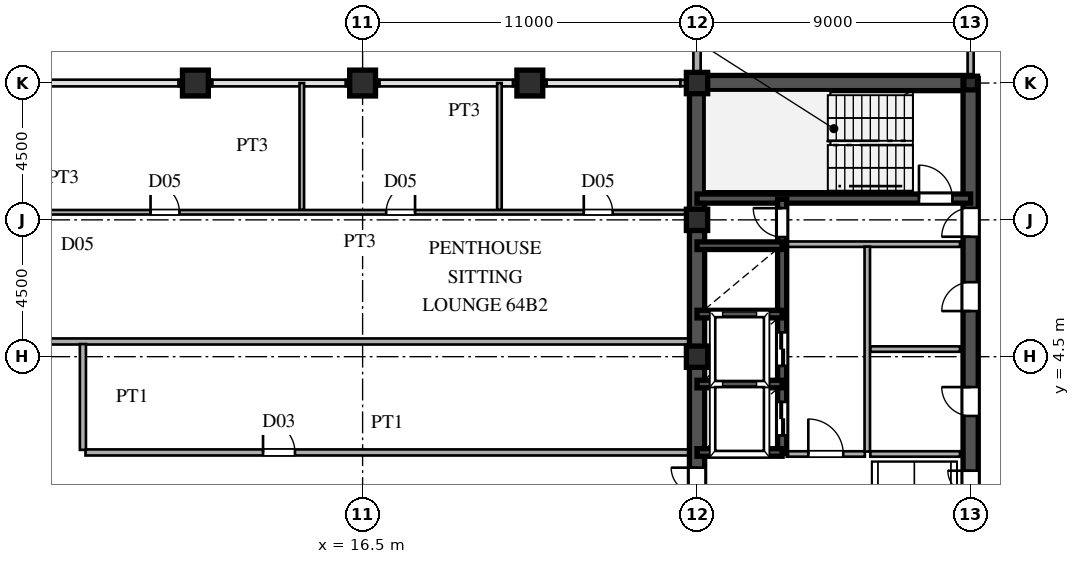
"""IFC4 building model, lengths in metres.
Left out: names, types, materials, properties, quantities, classifications, styles, units other than length and angle.
Written with IfcOpenShell. Run it as: python <this file> out.ifc"""

import sys

from ifc_helpers import new_model, si_unit, direction, frame, frame_2d, origin, origin_2d, place, context, subcontext, project, spatial, rectangle, hollow_rectangle, i_section, extrude, source, transform, mapped, element, fill, save


model = new_model("IFC4")
c1 = context("Model", 3, precision=1e-05, world=origin(), true_north=direction((0.0, 1.0)))
c2 = subcontext(c1, "Body", "Model", "MODEL_VIEW")
j1 = project(units=[si_unit("LENGTHUNIT", "METRE"), si_unit("PLANEANGLEUNIT", "RADIAN")], contexts=[c1])
p1 = place(None, origin())
s1 = spatial("IfcSite", under=j1, at=p1, CompositionType="ELEMENT")
p2 = place(p1, origin())
s2 = spatial("IfcBuilding", under=s1, at=p2, CompositionType="ELEMENT")
p3 = place(p2, frame((0.0, 0.0, 243.15)))
s3 = spatial("IfcBuildingStorey", under=s2, at=p3, CompositionType="ELEMENT", Elevation=243.15)
m1 = source(origin(), c2, "Body", "SweptSolid", [
    extrude(hollow_rectangle(XDim=0.7, YDim=0.7, WallThickness=0.03, at=origin_2d()), origin(), (0.0, 0.0, 1.0), 3.75),
])
for number, where, z_axis, x_axis in (
    (1, (27.5, 4.5, 0.0), (0.0, 0.0, 1.0), (1.0, 0.0, 0.0)),
    (2, (27.5, 9.0, 0.0), (0.0, 0.0, 1.0), (1.0, 0.0, 0.0)),
    (3, (27.5, 13.5, 0.0), (0.0, 0.0, 1.0), (1.0, 0.0, 0.0)),
):
    element("IfcColumn", number, at=place(p3, frame(where, z_axis=z_axis, x_axis=x_axis)), inside=s3, PredefinedType="COLUMN", context=c2, shape_type="MappedRepresentation", body=[
        mapped(m1, transform((0.0, 0.0, 0.0), scale=1.0)),
    ])
m2 = source(origin(), c2, "Body", "SweptSolid", [
    extrude(i_section(OverallWidth=0.45, OverallDepth=0.45, WebThickness=0.016, FlangeThickness=0.025, at=origin_2d()), origin(), (0.0, 0.0, 1.0), 3.75),
])
p4 = place(p3, frame((36.5, 13.5, 0.0), z_axis=(0.0, 0.0, 1.0), x_axis=(1.0, 0.0, 0.0)))
e4 = element("IfcColumn", 4, at=p4, inside=s3, PredefinedType="COLUMN", context=c2, shape_type="MappedRepresentation", body=[
    mapped(m2, transform((0.0, 0.0, 0.0), scale=1.0)),
])
m3 = source(origin(), c2, "Body", "SweptSolid", [
    extrude(hollow_rectangle(XDim=0.85, YDim=0.85, WallThickness=0.036, at=origin_2d()), origin(), (0.0, 0.0, 1.0), 3.75),
])
for number, where, z_axis, x_axis in (
    (5, (11.0, 13.5, 0.0), (0.0, 0.0, 1.0), (1.0, 0.0, 0.0)),
    (6, (16.5, 13.5, 0.0), (0.0, 0.0, 1.0), (1.0, 0.0, 0.0)),
    (7, (22.0, 13.5, 0.0), (0.0, 0.0, 1.0), (1.0, 0.0, 0.0)),
):
    element("IfcColumn", number, at=place(p3, frame(where, z_axis=z_axis, x_axis=x_axis)), inside=s3, PredefinedType="COLUMN", context=c2, shape_type="MappedRepresentation", body=[
        mapped(m3, transform((0.0, 0.0, 0.0), scale=1.0)),
    ])
p5 = place(p3, frame((27.5, 13.755, 0.0), z_axis=(0.0, 0.0, 1.0), x_axis=(0.0, 1.0, 0.0)))
e8 = element("IfcWall", 8, at=p5, inside=s3, PredefinedType="SOLIDWALL", context=c2, shape_type="SweptSolid", body=[
    extrude(rectangle(XDim=0.62, YDim=0.24, at=frame_2d((0.31, 0.0))), origin(), (0.0, 0.0, 1.0), 3.03),
])
p6 = place(p3, frame((27.5, 14.375, 0.0), z_axis=(0.0, 0.0, 1.0), x_axis=(0.0, 1.0, 0.0)))
e9 = element("IfcWall", 9, at=p6, inside=s3, PredefinedType="SOLIDWALL", context=c2, shape_type="SweptSolid", body=[
    extrude(rectangle(XDim=1.605, YDim=0.24, at=frame_2d((0.803, 0.0))), origin(), (0.0, 0.0, 1.0), 3.53),
])
for number, where, z_axis, x_axis in (
    (10, (10.45, 13.5, 0.0), (0.0, 0.0, 1.0), (1.0, 0.0, 0.0)),
    (11, (15.95, 13.5, 0.0), (0.0, 0.0, 1.0), (1.0, 0.0, 0.0)),
    (12, (21.45, 13.5, 0.0), (0.0, 0.0, 1.0), (1.0, 0.0, 0.0)),
):
    element("IfcWall", number, at=place(p3, frame(where, z_axis=z_axis, x_axis=x_axis)), inside=s3, PredefinedType="SOLIDWALL", context=c2, shape_type="SweptSolid", body=[
        extrude(rectangle(XDim=1.1, YDim=0.21, at=frame_2d((0.55, 0.0))), origin(), (0.0, 0.0, 1.0), 3.03),
    ])
p7 = place(p3, frame((26.95, 13.5, 0.0), z_axis=(0.0, 0.0, 1.0), x_axis=(1.0, 0.0, 0.0)))
e13 = element("IfcWall", 13, at=p7, inside=s3, PredefinedType="SOLIDWALL", context=c2, shape_type="SweptSolid", body=[
    extrude(rectangle(XDim=0.54, YDim=0.21, at=frame_2d((0.27, 0.0))), origin(), (0.0, 0.0, 1.0), 3.03),
])
p8 = place(p3, frame((27.5, 1.3, 0.0), z_axis=(0.0, 0.0, 1.0), x_axis=(0.0, 1.0, 0.0)))
e14 = element("IfcWall", 14, at=p8, inside=s3, PredefinedType="SHEAR", context=c2, shape_type="SweptSolid", body=[
    extrude(rectangle(XDim=12.2, YDim=0.5, at=frame_2d((6.1, 0.0))), origin(), (0.0, 0.0, 1.0), 3.53),
])
p9 = place(p3, frame((27.5, -1.3, 0.0), z_axis=(0.0, 0.0, 1.0), x_axis=(0.0, 1.0, 0.0)))
e15 = element("IfcWall", 15, at=p9, inside=s3, PredefinedType="SHEAR", context=c2, shape_type="SweptSolid", body=[
    extrude(rectangle(XDim=2.6, YDim=0.5, at=frame_2d((1.3, 0.0))), origin(), (0.0, 0.0, 1.0), 3.53),
])
p10 = place(p9, frame((0.45, 0.0, 0.0)))
e16 = element("IfcOpeningElement", 16, at=p10, cuts=e15, PredefinedType="OPENING", context=c2, shape_type="SweptSolid", body=[
    extrude(rectangle(XDim=1.7, YDim=2.35, at=frame_2d((0.85, 1.175))), frame((0.0, 0.26, 0.0), z_axis=(0.0, -1.0, 0.0), x_axis=(1.0, 0.0, 0.0)), (0.0, 0.0, 1.0), 0.52),
])
p11 = place(p3, frame((27.5, 13.5, 0.0), z_axis=(0.0, 0.0, 1.0), x_axis=(1.0, 0.0, 0.0)))
e17 = element("IfcWall", 17, at=p11, inside=s3, PredefinedType="SHEAR", context=c2, shape_type="SweptSolid", body=[
    extrude(rectangle(XDim=9.0, YDim=0.5, at=frame_2d((4.5, 0.0))), origin(), (0.0, 0.0, 1.0), 3.53),
])
p12 = place(p3, frame((36.5, -1.3, 0.0), z_axis=(0.0, 0.0, 1.0), x_axis=(0.0, 1.0, 0.0)))
e18 = element("IfcWall", 18, at=p12, inside=s3, PredefinedType="SHEAR", context=c2, shape_type="SweptSolid", body=[
    extrude(rectangle(XDim=2.6, YDim=0.5, at=frame_2d((1.3, 0.0))), origin(), (0.0, 0.0, 1.0), 3.53),
])
p13 = place(p12, frame((0.55, 0.0, 0.0)))
e19 = element("IfcOpeningElement", 19, at=p13, cuts=e18, PredefinedType="OPENING", context=c2, shape_type="SweptSolid", body=[
    extrude(rectangle(XDim=1.5, YDim=2.3, at=frame_2d((0.75, 1.15))), frame((0.0, 0.26, 0.0), z_axis=(0.0, -1.0, 0.0), x_axis=(1.0, 0.0, 0.0)), (0.0, 0.0, 1.0), 0.52),
])
p14 = place(p3, frame((36.5, 8.2, 0.0), z_axis=(0.0, 0.0, 1.0), x_axis=(0.0, 1.0, 0.0)))
e20 = element("IfcWall", 20, at=p14, inside=s3, PredefinedType="SHEAR", context=c2, shape_type="SweptSolid", body=[
    extrude(rectangle(XDim=5.45, YDim=0.5, at=frame_2d((2.725, 0.0))), origin(), (0.0, 0.0, 1.0), 3.53),
])
p15 = place(p14, frame((0.245, 0.0, 0.0)))
e21 = element("IfcOpeningElement", 21, at=p15, cuts=e20, PredefinedType="OPENING", context=c2, shape_type="SweptSolid", body=[
    extrude(rectangle(XDim=0.95, YDim=2.15, at=frame_2d((0.475, 1.075))), frame((0.0, 0.26, 0.0), z_axis=(0.0, -1.0, 0.0), x_axis=(1.0, 0.0, 0.0)), (0.0, 0.0, 1.0), 0.52),
])
p16 = place(p3, frame((36.5, 1.3, 0.0), z_axis=(0.0, 0.0, 1.0), x_axis=(0.0, 1.0, 0.0)))
e22 = element("IfcWall", 22, at=p16, inside=s3, PredefinedType="SHEAR", context=c2, shape_type="SweptSolid", body=[
    extrude(rectangle(XDim=3.45, YDim=0.5, at=frame_2d((1.725, 0.0))), origin(), (0.0, 0.0, 1.0), 3.53),
])
p17 = place(p16, frame((1.25, 0.0, 0.0)))
e23 = element("IfcOpeningElement", 23, at=p17, cuts=e22, PredefinedType="OPENING", context=c2, shape_type="SweptSolid", body=[
    extrude(rectangle(XDim=0.95, YDim=2.15, at=frame_2d((0.475, 1.075))), frame((0.0, 0.26, 0.0), z_axis=(0.0, -1.0, 0.0), x_axis=(1.0, 0.0, 0.0)), (0.0, 0.0, 1.0), 0.52),
])
p18 = place(p3, frame((36.5, 4.75, 0.0), z_axis=(0.0, 0.0, 1.0), x_axis=(0.0, 1.0, 0.0)))
e24 = element("IfcWall", 24, at=p18, inside=s3, PredefinedType="SHEAR", context=c2, shape_type="SweptSolid", body=[
    extrude(rectangle(XDim=3.45, YDim=0.5, at=frame_2d((1.725, 0.0))), origin(), (0.0, 0.0, 1.0), 3.53),
])
p19 = place(p18, frame((1.25, 0.0, 0.0)))
e25 = element("IfcOpeningElement", 25, at=p19, cuts=e24, PredefinedType="OPENING", context=c2, shape_type="SweptSolid", body=[
    extrude(rectangle(XDim=0.95, YDim=2.15, at=frame_2d((0.475, 1.075))), frame((0.0, 0.26, 0.0), z_axis=(0.0, -1.0, 0.0), x_axis=(1.0, 0.0, 0.0)), (0.0, 0.0, 1.0), 0.52),
])
p20 = place(p3, frame((27.5, 9.7, 0.0), z_axis=(0.0, 0.0, 1.0), x_axis=(1.0, 0.0, 0.0)))
e26 = element("IfcWall", 26, at=p20, inside=s3, PredefinedType="SHEAR", context=c2, shape_type="SweptSolid", body=[
    extrude(rectangle(XDim=9.0, YDim=0.3, at=frame_2d((4.5, 0.0))), origin(), (0.0, 0.0, 1.0), 3.53),
])
p21 = place(p20, frame((7.3, 0.0, 0.0)))
e27 = element("IfcOpeningElement", 27, at=p21, cuts=e26, PredefinedType="OPENING", context=c2, shape_type="SweptSolid", body=[
    extrude(rectangle(XDim=1.1, YDim=2.2, at=frame_2d((0.55, 1.1))), frame((0.0, 0.16, 0.0), z_axis=(0.0, -1.0, 0.0), x_axis=(1.0, 0.0, 0.0)), (0.0, 0.0, 1.0), 0.32),
])
for number, where, z_axis, x_axis in (
    (28, (27.5, 1.35, 0.0), (0.0, 0.0, 1.0), (1.0, 0.0, 0.0)),
    (29, (27.5, 3.6, 0.0), (0.0, 0.0, 1.0), (1.0, 0.0, 0.0)),
    (30, (27.5, 5.9, 0.0), (0.0, 0.0, 1.0), (1.0, 0.0, 0.0)),
    (31, (27.5, 8.15, 0.0), (0.0, 0.0, 1.0), (1.0, 0.0, 0.0)),
):
    element("IfcWall", number, at=place(p3, frame(where, z_axis=z_axis, x_axis=x_axis)), inside=s3, PredefinedType="SHEAR", context=c2, shape_type="SweptSolid", body=[
        extrude(rectangle(XDim=2.8, YDim=0.25, at=frame_2d((1.4, 0.0))), origin(), (0.0, 0.0, 1.0), 3.53),
    ])
p22 = place(p3, frame((30.3, 1.32, 0.0), z_axis=(0.0, 0.0, 1.0), x_axis=(0.0, 1.0, 0.0)))
e32 = element("IfcWall", 32, at=p22, inside=s3, PredefinedType="SHEAR", context=c2, shape_type="SweptSolid", body=[
    extrude(rectangle(XDim=2.28, YDim=0.3, at=frame_2d((1.14, 0.0))), origin(), (0.0, 0.0, 1.0), 3.53),
])
p23 = place(p22, frame((0.59, 0.0, 0.0)))
e33 = element("IfcOpeningElement", 33, at=p23, cuts=e32, PredefinedType="OPENING", context=c2, shape_type="SweptSolid", body=[
    extrude(rectangle(XDim=1.1, YDim=2.2, at=frame_2d((0.55, 1.1))), frame((0.0, 0.16, 0.0), z_axis=(0.0, -1.0, 0.0), x_axis=(1.0, 0.0, 0.0)), (0.0, 0.0, 1.0), 0.32),
])
p24 = place(p3, frame((30.3, 3.6, 0.0), z_axis=(0.0, 0.0, 1.0), x_axis=(0.0, 1.0, 0.0)))
e34 = element("IfcWall", 34, at=p24, inside=s3, PredefinedType="SHEAR", context=c2, shape_type="SweptSolid", body=[
    extrude(rectangle(XDim=2.3, YDim=0.3, at=frame_2d((1.15, 0.0))), origin(), (0.0, 0.0, 1.0), 3.53),
])
p25 = place(p24, frame((0.6, 0.0, 0.0)))
e35 = element("IfcOpeningElement", 35, at=p25, cuts=e34, PredefinedType="OPENING", context=c2, shape_type="SweptSolid", body=[
    extrude(rectangle(XDim=1.1, YDim=2.2, at=frame_2d((0.55, 1.1))), frame((0.0, 0.16, 0.0), z_axis=(0.0, -1.0, 0.0), x_axis=(1.0, 0.0, 0.0)), (0.0, 0.0, 1.0), 0.32),
])
p26 = place(p3, frame((30.3, 5.9, 0.0), z_axis=(0.0, 0.0, 1.0), x_axis=(0.0, 1.0, 0.0)))
e36 = element("IfcWall", 36, at=p26, inside=s3, PredefinedType="SHEAR", context=c2, shape_type="SweptSolid", body=[
    extrude(rectangle(XDim=2.25, YDim=0.3, at=frame_2d((1.125, 0.0))), origin(), (0.0, 0.0, 1.0), 3.53),
])
p27 = place(p3, frame((30.3, 8.15, 0.0), z_axis=(0.0, 0.0, 1.0), x_axis=(0.0, 1.0, 0.0)))
e37 = element("IfcWall", 37, at=p27, inside=s3, PredefinedType="SHEAR", context=c2, shape_type="SweptSolid", body=[
    extrude(rectangle(XDim=1.53, YDim=0.3, at=frame_2d((0.765, 0.0))), origin(), (0.0, 0.0, 1.0), 3.53),
])
p28 = place(p27, frame((0.285, 0.0, 0.0)))
e38 = element("IfcOpeningElement", 38, at=p28, cuts=e37, PredefinedType="OPENING", context=c2, shape_type="SweptSolid", body=[
    extrude(rectangle(XDim=0.95, YDim=2.15, at=frame_2d((0.475, 1.075))), frame((0.0, 0.16, 0.0), z_axis=(0.0, -1.0, 0.0), x_axis=(1.0, 0.0, 0.0)), (0.0, 0.0, 1.0), 0.32),
])
p29 = place(p3, frame((30.45, 8.2, 0.0), z_axis=(0.0, 0.0, 1.0), x_axis=(1.0, 0.0, 0.0)))
e39 = element("IfcWall", 39, at=p29, inside=s3, PredefinedType="PARTITIONING", context=c2, shape_type="SweptSolid", body=[
    extrude(rectangle(XDim=5.7, YDim=0.18, at=frame_2d((2.85, 0.0))), origin(), (0.0, 0.0, 1.0), 3.53),
])
p30 = place(p3, frame((33.1, 1.38, 0.0), z_axis=(0.0, 0.0, 1.0), x_axis=(0.0, 1.0, 0.0)))
e40 = element("IfcWall", 40, at=p30, inside=s3, PredefinedType="PARTITIONING", context=c2, shape_type="SweptSolid", body=[
    extrude(rectangle(XDim=6.74, YDim=0.18, at=frame_2d((3.37, 0.0))), origin(), (0.0, 0.0, 1.0), 3.53),
])
p31 = place(p3, frame((30.45, 1.3, 0.0), z_axis=(0.0, 0.0, 1.0), x_axis=(1.0, 0.0, 0.0)))
e41 = element("IfcWall", 41, at=p31, inside=s3, PredefinedType="PARTITIONING", context=c2, shape_type="SweptSolid", body=[
    extrude(rectangle(XDim=2.57, YDim=0.18, at=frame_2d((1.285, 0.0))), origin(), (0.0, 0.0, 1.0), 3.53),
])
p32 = place(p31, frame((0.71, 0.0, 0.0)))
e42 = element("IfcOpeningElement", 42, at=p32, cuts=e41, PredefinedType="OPENING", context=c2, shape_type="SweptSolid", body=[
    extrude(rectangle(XDim=1.15, YDim=2.2, at=frame_2d((0.575, 1.1))), frame((0.0, 0.1, 0.0), z_axis=(0.0, -1.0, 0.0), x_axis=(1.0, 0.0, 0.0)), (0.0, 0.0, 1.0), 0.2),
])
for number, where, z_axis, x_axis in (
    (43, (33.2, 1.3, 0.0), (0.0, 0.0, 1.0), (1.0, 0.0, 0.0)),
    (44, (33.2, 4.75, 0.0), (0.0, 0.0, 1.0), (1.0, 0.0, 0.0)),
):
    element("IfcWall", number, at=place(p3, frame(where, z_axis=z_axis, x_axis=x_axis)), inside=s3, PredefinedType="PARTITIONING", context=c2, shape_type="SweptSolid", body=[
        extrude(rectangle(XDim=2.95, YDim=0.18, at=frame_2d((1.475, 0.0))), origin(), (0.0, 0.0, 1.0), 3.53),
    ])
p33 = place(p3, frame((7.385, 1.35, 0.0), z_axis=(0.0, 0.0, 1.0), x_axis=(1.0, 0.0, 0.0)))
e45 = element("IfcWall", 45, at=p33, inside=s3, PredefinedType="PARTITIONING", context=c2, shape_type="SweptSolid", body=[
    extrude(rectangle(XDim=19.86, YDim=0.2, at=frame_2d((9.93, 0.0))), origin(), (0.0, 0.0, 1.0), 3.53),
])
p34 = place(p33, frame((5.84, 0.0, 0.0)))
e46 = element("IfcOpeningElement", 46, at=p34, cuts=e45, PredefinedType="OPENING", context=c2, shape_type="SweptSolid", body=[
    extrude(rectangle(XDim=1.05, YDim=2.25, at=frame_2d((0.525, 1.125))), frame((0.0, 0.11, 0.0), z_axis=(0.0, -1.0, 0.0), x_axis=(1.0, 0.0, 0.0)), (0.0, 0.0, 1.0), 0.22),
])
p35 = place(p3, frame((-27.245, 5.0, 0.0), z_axis=(0.0, 0.0, 1.0), x_axis=(1.0, 0.0, 0.0)))
e47 = element("IfcWall", 47, at=p35, inside=s3, PredefinedType="PARTITIONING", context=c2, shape_type="SweptSolid", body=[
    extrude(rectangle(XDim=54.49, YDim=0.2, at=frame_2d((27.245, 0.0))), origin(), (0.0, 0.0, 1.0), 3.53),
])
p36 = place(p35, frame((23.47, 0.0, 0.0)))
e48 = element("IfcOpeningElement", 48, at=p36, cuts=e47, PredefinedType="OPENING", context=c2, shape_type="SweptSolid", body=[
    extrude(rectangle(XDim=1.05, YDim=2.25, at=frame_2d((0.525, 1.125))), frame((0.0, 0.11, 0.0), z_axis=(0.0, -1.0, 0.0), x_axis=(1.0, 0.0, 0.0)), (0.0, 0.0, 1.0), 0.22),
])
p37 = place(p3, frame((5.585, 9.25, 0.0), z_axis=(0.0, 0.0, 1.0), x_axis=(1.0, 0.0, 0.0)))
e49 = element("IfcWall", 49, at=p37, inside=s3, PredefinedType="PARTITIONING", context=c2, shape_type="SweptSolid", body=[
    extrude(rectangle(XDim=21.66, YDim=0.15, at=frame_2d((10.83, 0.0))), origin(), (0.0, 0.0, 1.0), 3.53),
])
p38 = place(p37, frame((3.94, 0.0, 0.0)))
e50 = element("IfcOpeningElement", 50, at=p38, cuts=e49, PredefinedType="OPENING", context=c2, shape_type="SweptSolid", body=[
    extrude(rectangle(XDim=0.95, YDim=2.15, at=frame_2d((0.475, 1.075))), frame((0.0, 0.085, 0.0), z_axis=(0.0, -1.0, 0.0), x_axis=(1.0, 0.0, 0.0)), (0.0, 0.0, 1.0), 0.17),
])
p39 = place(p37, frame((11.69, 0.0, 0.0)))
e51 = element("IfcOpeningElement", 51, at=p39, cuts=e49, PredefinedType="OPENING", context=c2, shape_type="SweptSolid", body=[
    extrude(rectangle(XDim=0.95, YDim=2.15, at=frame_2d((0.475, 1.075))), frame((0.0, 0.085, 0.0), z_axis=(0.0, -1.0, 0.0), x_axis=(1.0, 0.0, 0.0)), (0.0, 0.0, 1.0), 0.17),
])
p40 = place(p37, frame((18.19, 0.0, 0.0)))
e52 = element("IfcOpeningElement", 52, at=p40, cuts=e49, PredefinedType="OPENING", context=c2, shape_type="SweptSolid", body=[
    extrude(rectangle(XDim=0.95, YDim=2.15, at=frame_2d((0.475, 1.075))), frame((0.0, 0.085, 0.0), z_axis=(0.0, -1.0, 0.0), x_axis=(1.0, 0.0, 0.0)), (0.0, 0.0, 1.0), 0.17),
])
p41 = place(p3, frame((7.3, 1.435, 0.0), z_axis=(0.0, 0.0, 1.0), x_axis=(0.0, 1.0, 0.0)))
e53 = element("IfcWall", 53, at=p41, inside=s3, PredefinedType="PARTITIONING", context=c2, shape_type="SweptSolid", body=[
    extrude(rectangle(XDim=3.48, YDim=0.2, at=frame_2d((1.74, 0.0))), origin(), (0.0, 0.0, 1.0), 3.53),
])
for number, where, z_axis, x_axis in (
    (54, (14.5, 9.335, 0.0), (0.0, 0.0, 1.0), (0.0, 1.0, 0.0)),
    (55, (21.0, 9.335, 0.0), (0.0, 0.0, 1.0), (0.0, 1.0, 0.0)),
):
    element("IfcWall", number, at=place(p3, frame(where, z_axis=z_axis, x_axis=x_axis)), inside=s3, PredefinedType="PARTITIONING", context=c2, shape_type="SweptSolid", body=[
        extrude(rectangle(XDim=4.165, YDim=0.15, at=frame_2d((2.083, 0.0))), origin(), (0.0, 0.0, 1.0), 3.53),
    ])
p42 = place(p3, frame((36.5, 13.755, 0.0), z_axis=(0.0, 0.0, 1.0), x_axis=(0.0, 1.0, 0.0)))
e56 = element("IfcWall", 56, at=p42, inside=s3, PredefinedType="PARTITIONING", context=c2, shape_type="SweptSolid", body=[
    extrude(rectangle(XDim=1.76, YDim=0.2, at=frame_2d((0.88, 0.0))), origin(), (0.0, 0.0, 1.0), 2.93),
])
m4 = source(origin(), c2, "Body", "SweptSolid", [
    extrude(rectangle(XDim=1.7, YDim=2.35, at=frame_2d((0.85, 1.175))), frame((0.0, 0.025, 0.0), z_axis=(0.0, -1.0, 0.0), x_axis=(1.0, 0.0, 0.0)), (0.0, 0.0, 1.0), 0.05),
])
p43 = place(p10, origin())
e57 = element("IfcDoor", 57, at=p43, inside=s3, OperationType="DOUBLE_SWING_LEFT", PredefinedType="DOOR", context=c2, shape_type="MappedRepresentation", body=[
    mapped(m4, transform((0.0, 0.0, 0.0), scale=1.0)),
])
fill(e16, e57)
m5 = source(origin(), c2, "Body", "SweptSolid", [
    extrude(rectangle(XDim=1.5, YDim=2.3, at=frame_2d((0.75, 1.15))), frame((0.0, 0.025, 0.0), z_axis=(0.0, -1.0, 0.0), x_axis=(1.0, 0.0, 0.0)), (0.0, 0.0, 1.0), 0.05),
])
p44 = place(p13, origin())
e58 = element("IfcDoor", 58, at=p44, inside=s3, OperationType="DOUBLE_SWING_LEFT", PredefinedType="DOOR", context=c2, shape_type="MappedRepresentation", body=[
    mapped(m5, transform((0.0, 0.0, 0.0), scale=1.0)),
])
fill(e19, e58)
m6 = source(origin(), c2, "Body", "SweptSolid", [
    extrude(rectangle(XDim=0.95, YDim=2.15, at=frame_2d((0.475, 1.075))), frame((0.0, 0.025, 0.0), z_axis=(0.0, -1.0, 0.0), x_axis=(1.0, 0.0, 0.0)), (0.0, 0.0, 1.0), 0.05),
])
p45 = place(p15, origin())
e59 = element("IfcDoor", 59, at=p45, inside=s3, OperationType="SINGLE_SWING_LEFT", PredefinedType="DOOR", context=c2, shape_type="MappedRepresentation", body=[
    mapped(m6, transform((0.0, 0.0, 0.0), scale=1.0)),
])
fill(e21, e59)
p46 = place(p17, origin())
e60 = element("IfcDoor", 60, at=p46, inside=s3, OperationType="SINGLE_SWING_RIGHT", PredefinedType="DOOR", context=c2, shape_type="MappedRepresentation", body=[
    mapped(m6, transform((0.0, 0.0, 0.0), scale=1.0)),
])
fill(e23, e60)
p47 = place(p19, origin())
e61 = element("IfcDoor", 61, at=p47, inside=s3, OperationType="SINGLE_SWING_LEFT", PredefinedType="DOOR", context=c2, shape_type="MappedRepresentation", body=[
    mapped(m6, transform((0.0, 0.0, 0.0), scale=1.0)),
])
fill(e25, e61)
m7 = source(origin(), c2, "Body", "SweptSolid", [
    extrude(rectangle(XDim=1.1, YDim=2.2, at=frame_2d((0.55, 1.1))), frame((0.0, 0.025, 0.0), z_axis=(0.0, -1.0, 0.0), x_axis=(1.0, 0.0, 0.0)), (0.0, 0.0, 1.0), 0.05),
])
p48 = place(p21, origin())
e62 = element("IfcDoor", 62, at=p48, inside=s3, OperationType="SINGLE_SWING_LEFT", PredefinedType="DOOR", context=c2, shape_type="MappedRepresentation", body=[
    mapped(m7, transform((0.0, 0.0, 0.0), scale=1.0)),
])
fill(e27, e62)
m8 = source(origin(), c2, "Body", "SweptSolid", [
    extrude(rectangle(XDim=1.1, YDim=2.2, at=frame_2d((0.55, 1.1))), frame((0.0, 0.025, 0.0), z_axis=(0.0, -1.0, 0.0), x_axis=(1.0, 0.0, 0.0)), (0.0, 0.0, 1.0), 0.05),
])
p49 = place(p23, origin())
e63 = element("IfcDoor", 63, at=p49, inside=s3, OperationType="DOUBLE_DOOR_SLIDING", PredefinedType="DOOR", context=c2, shape_type="MappedRepresentation", body=[
    mapped(m8, transform((0.0, 0.0, 0.0), scale=1.0)),
])
fill(e33, e63)
p50 = place(p25, origin())
e64 = element("IfcDoor", 64, at=p50, inside=s3, OperationType="DOUBLE_DOOR_SLIDING", PredefinedType="DOOR", context=c2, shape_type="MappedRepresentation", body=[
    mapped(m8, transform((0.0, 0.0, 0.0), scale=1.0)),
])
fill(e35, e64)
p51 = place(p28, origin())
e65 = element("IfcDoor", 65, at=p51, inside=s3, OperationType="SINGLE_SWING_RIGHT", PredefinedType="DOOR", context=c2, shape_type="MappedRepresentation", body=[
    mapped(m6, transform((0.0, 0.0, 0.0), scale=1.0)),
])
fill(e38, e65)
m9 = source(origin(), c2, "Body", "SweptSolid", [
    extrude(rectangle(XDim=1.15, YDim=2.2, at=frame_2d((0.575, 1.1))), frame((0.0, 0.025, 0.0), z_axis=(0.0, -1.0, 0.0), x_axis=(1.0, 0.0, 0.0)), (0.0, 0.0, 1.0), 0.05),
])
p52 = place(p32, origin())
e66 = element("IfcDoor", 66, at=p52, inside=s3, OperationType="SINGLE_SWING_LEFT", PredefinedType="DOOR", context=c2, shape_type="MappedRepresentation", body=[
    mapped(m9, transform((0.0, 0.0, 0.0), scale=1.0)),
])
fill(e42, e66)
m10 = source(origin(), c2, "Body", "SweptSolid", [
    extrude(rectangle(XDim=1.05, YDim=2.25, at=frame_2d((0.525, 1.125))), frame((0.0, 0.025, 0.0), z_axis=(0.0, -1.0, 0.0), x_axis=(1.0, 0.0, 0.0)), (0.0, 0.0, 1.0), 0.05),
])
p53 = place(p34, origin())
e67 = element("IfcDoor", 67, at=p53, inside=s3, OperationType="SINGLE_SWING_LEFT", PredefinedType="DOOR", context=c2, shape_type="MappedRepresentation", body=[
    mapped(m10, transform((0.0, 0.0, 0.0), scale=1.0)),
])
fill(e46, e67)
m11 = source(origin(), c2, "Body", "SweptSolid", [
    extrude(rectangle(XDim=0.95, YDim=2.15, at=frame_2d((0.475, 1.075))), frame((0.0, 0.025, 0.0), z_axis=(0.0, -1.0, 0.0), x_axis=(1.0, 0.0, 0.0)), (0.0, 0.0, 1.0), 0.05),
])
p54 = place(p38, origin())
e68 = element("IfcDoor", 68, at=p54, inside=s3, OperationType="SINGLE_SWING_LEFT", PredefinedType="DOOR", context=c2, shape_type="MappedRepresentation", body=[
    mapped(m11, transform((0.0, 0.0, 0.0), scale=1.0)),
])
fill(e50, e68)
p55 = place(p39, origin())
e69 = element("IfcDoor", 69, at=p55, inside=s3, OperationType="SINGLE_SWING_RIGHT", PredefinedType="DOOR", context=c2, shape_type="MappedRepresentation", body=[
    mapped(m11, transform((0.0, 0.0, 0.0), scale=1.0)),
])
fill(e51, e69)
p56 = place(p40, origin())
e70 = element("IfcDoor", 70, at=p56, inside=s3, OperationType="SINGLE_SWING_LEFT", PredefinedType="DOOR", context=c2, shape_type="MappedRepresentation", body=[
    mapped(m11, transform((0.0, 0.0, 0.0), scale=1.0)),
])
fill(e52, e70)
save(model, sys.argv[1])
